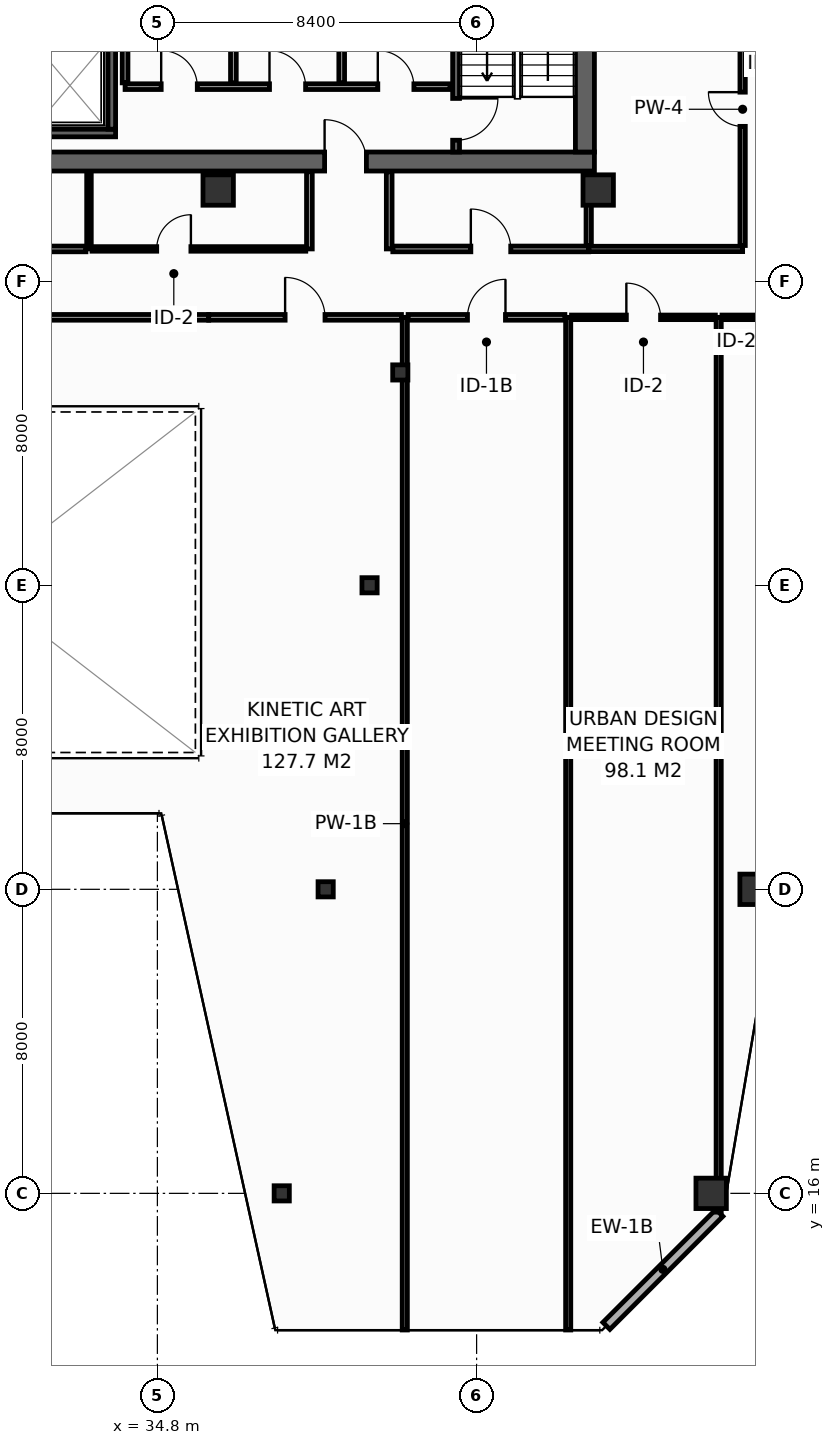
"""IFC4 building model, lengths in metres.
Left out: names, types, materials, properties, quantities, classifications, styles, units other than length and angle.
Written with IfcOpenShell. Run it as: python <this file> out.ifc"""

import sys

from ifc_helpers import new_model, si_unit, direction, frame, frame_2d, origin, origin_2d, place, context, subcontext, project, spatial, rectangle, hollow_rectangle, extrude, element, fill, save


model = new_model("IFC4")
c1 = context("Model", 3, precision=1e-05, world=origin(), true_north=direction((0.0, 1.0)))
c2 = subcontext(c1, "Body", "Model", "MODEL_VIEW")
j1 = project(units=[si_unit("LENGTHUNIT", "METRE"), si_unit("PLANEANGLEUNIT", "RADIAN")], contexts=[c1])
p1 = place(None, origin())
s1 = spatial("IfcSite", under=j1, at=p1, CompositionType="ELEMENT")
p2 = place(p1, origin())
s2 = spatial("IfcBuilding", under=s1, at=p2, CompositionType="ELEMENT")
p3 = place(p2, frame((0.0, 0.0, 201.8)))
s3 = spatial("IfcBuildingStorey", under=s2, at=p3, CompositionType="ELEMENT", Elevation=201.8)
p4 = place(p3, frame((13.6, 43.15, 0.0), z_axis=(0.0, 0.0, 1.0), x_axis=(1.0, 0.0, 0.0)))
e1 = element("IfcWall", 1, at=p4, inside=s3, PredefinedType="SHEAR", context=c2, shape_type="SweptSolid", body=[
    extrude(rectangle(XDim=32.7, YDim=0.5, at=frame_2d((16.35, 0.0))), origin(), (0.0, 0.0, 1.0), 3.55),
])
p5 = place(p4, frame((5.4, 0.0, 0.0)))
e2 = element("IfcOpeningElement", 2, at=p5, cuts=e1, PredefinedType="OPENING", context=c2, shape_type="SweptSolid", body=[
    extrude(rectangle(XDim=1.1, YDim=2.15, at=frame_2d((0.55, 1.075))), frame((0.0, 0.26, 0.0), z_axis=(0.0, -1.0, 0.0), x_axis=(1.0, 0.0, 0.0)), (0.0, 0.0, 1.0), 0.52),
])
p6 = place(p4, frame((25.6, 0.0, 0.0)))
e3 = element("IfcOpeningElement", 3, at=p6, cuts=e1, PredefinedType="OPENING", context=c2, shape_type="SweptSolid", body=[
    extrude(rectangle(XDim=1.1, YDim=2.15, at=frame_2d((0.55, 1.075))), frame((0.0, 0.26, 0.0), z_axis=(0.0, -1.0, 0.0), x_axis=(1.0, 0.0, 0.0)), (0.0, 0.0, 1.0), 0.52),
])
p7 = place(p3, frame((46.05, 43.4, 0.0), z_axis=(0.0, 0.0, 1.0), x_axis=(0.0, 1.0, 0.0)))
e4 = element("IfcWall", 4, at=p7, inside=s3, PredefinedType="SHEAR", context=c2, shape_type="SweptSolid", body=[
    extrude(rectangle(XDim=10.4, YDim=0.5, at=frame_2d((5.2, 0.0))), origin(), (0.0, 0.0, 1.0), 3.55),
])
for number, where, z_axis, x_axis in (
    (5, (36.4, 42.4, 0.0), (0.0, 0.0, 1.0), (1.0, 0.0, 0.0)),
    (6, (46.4, 42.4, 0.0), (0.0, 0.0, 1.0), (1.0, 0.0, 0.0)),
    (7, (49.372, 16.0, 0.0), (0.0, 0.0, 1.0), (1.0, 0.0, 0.0)),
):
    element("IfcColumn", number, at=place(p3, frame(where, z_axis=z_axis, x_axis=x_axis)), inside=s3, PredefinedType="COLUMN", context=c2, shape_type="SweptSolid", body=[
        extrude(hollow_rectangle(XDim=0.8, YDim=0.8, WallThickness=0.036, at=origin_2d()), origin(), (0.0, 0.0, 1.0), 3.8),
    ])
p8 = place(p3, frame((38.072, 16.0, 0.0), z_axis=(0.0, 0.0, 1.0), x_axis=(1.0, 0.0, 0.0)))
e8 = element("IfcColumn", 8, at=p8, inside=s3, PredefinedType="COLUMN", context=c2, shape_type="SweptSolid", body=[
    extrude(hollow_rectangle(XDim=0.4, YDim=0.4, WallThickness=0.016, at=origin_2d()), origin(), (0.0, 0.0, 1.0), 3.8),
])
p9 = place(p3, frame((50.528, 24.0, 0.0), z_axis=(0.0, 0.0, 1.0), x_axis=(1.0, 0.0, 0.0)))
e9 = element("IfcColumn", 9, at=p9, inside=s3, PredefinedType="COLUMN", context=c2, shape_type="SweptSolid", body=[
    extrude(hollow_rectangle(XDim=0.8, YDim=0.8, WallThickness=0.036, at=origin_2d()), origin(), (0.0, 0.0, 1.0), 3.8),
])
for number, where, z_axis, x_axis in (
    (10, (39.228, 24.0, 0.0), (0.0, 0.0, 1.0), (1.0, 0.0, 0.0)),
    (11, (40.383, 32.0, 0.0), (0.0, 0.0, 1.0), (1.0, 0.0, 0.0)),
    (12, (41.192, 37.6, 0.0), (0.0, 0.0, 1.0), (1.0, 0.0, 0.0)),
):
    element("IfcColumn", number, at=place(p3, frame(where, z_axis=z_axis, x_axis=x_axis)), inside=s3, PredefinedType="COLUMN", context=c2, shape_type="SweptSolid", body=[
        extrude(hollow_rectangle(XDim=0.4, YDim=0.4, WallThickness=0.016, at=origin_2d()), origin(), (0.0, 0.0, 1.0), 3.8),
    ])
p10 = place(p3, frame((31.125, 43.9, 0.0), z_axis=(0.0, 0.0, 1.0), x_axis=(1.0, 0.0, 0.0)))
e13 = element("IfcWall", 13, at=p10, inside=s3, PredefinedType="SHEAR", context=c2, shape_type="SweptSolid", body=[
    extrude(rectangle(XDim=2.575, YDim=0.2, at=frame_2d((1.288, 0.0))), origin(), (0.0, 0.0, 1.0), 3.55),
])
p11 = place(p3, frame((33.6, 44.0, 0.0), z_axis=(0.0, 0.0, 1.0), x_axis=(0.0, 1.0, 0.0)))
e14 = element("IfcWall", 14, at=p11, inside=s3, PredefinedType="SHEAR", context=c2, shape_type="SweptSolid", body=[
    extrude(rectangle(XDim=2.3, YDim=0.2, at=frame_2d((1.15, 0.0))), origin(), (0.0, 0.0, 1.0), 3.55),
])
p12 = place(p3, frame((42.66, 53.8, 0.0), z_axis=(0.0, 0.0, 1.0), x_axis=(0.0, -1.0, 0.0)))
e15 = element("IfcWall", 15, at=p12, inside=s3, PredefinedType="SHEAR", context=c2, shape_type="SweptSolid", body=[
    extrude(rectangle(XDim=10.4, YDim=0.18, at=frame_2d((5.2, 0.0))), origin(), (0.0, 0.0, 1.0), 3.55),
])
p13 = place(p12, frame((8.99, 0.0, 0.0)))
e16 = element("IfcOpeningElement", 16, at=p13, cuts=e15, PredefinedType="OPENING", context=c2, shape_type="SweptSolid", body=[
    extrude(rectangle(XDim=1.1, YDim=2.15, at=frame_2d((0.55, 1.075))), frame((0.0, 0.1, 0.0), z_axis=(0.0, -1.0, 0.0), x_axis=(1.0, 0.0, 0.0)), (0.0, 0.0, 1.0), 0.2),
])
p14 = place(p3, frame((33.95, 45.12, 0.0), z_axis=(0.0, 0.0, 1.0), x_axis=(1.0, 0.0, 0.0)))
e17 = element("IfcWall", 17, at=p14, inside=s3, PredefinedType="PARTITIONING", context=c2, shape_type="SweptSolid", body=[
    extrude(rectangle(XDim=8.55, YDim=0.15, at=frame_2d((4.275, 0.0))), origin(), (0.0, 0.0, 1.0), 3.55),
])
p15 = place(p14, frame((0.95, 0.0, 0.0)))
e18 = element("IfcOpeningElement", 18, at=p15, cuts=e17, PredefinedType="OPENING", context=c2, shape_type="SweptSolid", body=[
    extrude(rectangle(XDim=0.95, YDim=2.15, at=frame_2d((0.475, 1.075))), frame((0.0, 0.085, 0.0), z_axis=(0.0, -1.0, 0.0), x_axis=(1.0, 0.0, 0.0)), (0.0, 0.0, 1.0), 0.17),
])
p16 = place(p14, frame((3.8, 0.0, 0.0)))
e19 = element("IfcOpeningElement", 19, at=p16, cuts=e17, PredefinedType="OPENING", context=c2, shape_type="SweptSolid", body=[
    extrude(rectangle(XDim=0.95, YDim=2.15, at=frame_2d((0.475, 1.075))), frame((0.0, 0.085, 0.0), z_axis=(0.0, -1.0, 0.0), x_axis=(1.0, 0.0, 0.0)), (0.0, 0.0, 1.0), 0.17),
])
p17 = place(p14, frame((6.65, 0.0, 0.0)))
e20 = element("IfcOpeningElement", 20, at=p17, cuts=e17, PredefinedType="OPENING", context=c2, shape_type="SweptSolid", body=[
    extrude(rectangle(XDim=0.95, YDim=2.15, at=frame_2d((0.475, 1.075))), frame((0.0, 0.085, 0.0), z_axis=(0.0, -1.0, 0.0), x_axis=(1.0, 0.0, 0.0)), (0.0, 0.0, 1.0), 0.17),
])
for number, where, z_axis, x_axis in (
    (21, (33.95, 45.22, 0.0), (0.0, 0.0, 1.0), (0.0, 1.0, 0.0)),
    (22, (36.8, 45.22, 0.0), (0.0, 0.0, 1.0), (0.0, 1.0, 0.0)),
    (23, (39.65, 45.22, 0.0), (0.0, 0.0, 1.0), (0.0, 1.0, 0.0)),
):
    element("IfcWall", number, at=place(p3, frame(where, z_axis=z_axis, x_axis=x_axis)), inside=s3, PredefinedType="PARTITIONING", context=c2, shape_type="SweptSolid", body=[
        extrude(rectangle(XDim=2.33, YDim=0.15, at=frame_2d((1.165, 0.0))), origin(), (0.0, 0.0, 1.0), 3.55),
    ])
p18 = place(p3, frame((46.615, 12.513, 0.0), z_axis=(0.0, 0.0, 1.0), x_axis=(0.707135806771, 0.70707775441, 0.0)))
e24 = element("IfcWall", 24, at=p18, inside=s3, PredefinedType="STANDARD", context=c2, shape_type="SweptSolid", body=[
    extrude(rectangle(XDim=4.206, YDim=0.26, at=frame_2d((2.103, 0.0))), origin(), (0.0, 0.0, 1.0), 3.55),
])
p19 = place(p3, frame((46.15, 40.85, 0.0), z_axis=(0.0, 0.0, 1.0), x_axis=(1.0, 0.0, 0.0)))
e25 = element("IfcWall", 25, at=p19, inside=s3, PredefinedType="PARTITIONING", context=c2, shape_type="SweptSolid", body=[
    extrude(rectangle(XDim=4.05, YDim=0.14, at=frame_2d((2.025, 0.0))), origin(), (0.0, 0.0, 1.0), 3.55),
])
p20 = place(p3, frame((46.15, 40.94, 0.0), z_axis=(0.0, 0.0, 1.0), x_axis=(0.0, 1.0, 0.0)))
e26 = element("IfcWall", 26, at=p20, inside=s3, PredefinedType="PARTITIONING", context=c2, shape_type="SweptSolid", body=[
    extrude(rectangle(XDim=1.94, YDim=0.14, at=frame_2d((0.97, 0.0))), origin(), (0.0, 0.0, 1.0), 3.55),
])
p21 = place(p3, frame((50.2, 40.94, 0.0), z_axis=(0.0, 0.0, 1.0), x_axis=(0.0, 1.0, 0.0)))
e27 = element("IfcWall", 27, at=p21, inside=s3, PredefinedType="PARTITIONING", context=c2, shape_type="SweptSolid", body=[
    extrude(rectangle(XDim=7.17, YDim=0.14, at=frame_2d((3.585, 0.0))), origin(), (0.0, 0.0, 1.0), 2.835),
])
p22 = place(p21, frame((3.135, 0.0, 0.0)))
e28 = element("IfcOpeningElement", 28, at=p22, cuts=e27, PredefinedType="OPENING", context=c2, shape_type="SweptSolid", body=[
    extrude(rectangle(XDim=0.9, YDim=2.1, at=frame_2d((0.45, 1.05))), frame((0.0, 0.08, 0.0), z_axis=(0.0, -1.0, 0.0), x_axis=(1.0, 0.0, 0.0)), (0.0, 0.0, 1.0), 0.16),
])
for number, where, z_axis, x_axis in (
    (29, (38.8, 40.85, 0.0), (0.0, 0.0, 1.0), (0.0, 1.0, 0.0)),
    (30, (40.9, 40.85, 0.0), (0.0, 0.0, 1.0), (0.0, 1.0, 0.0)),
):
    element("IfcWall", number, at=place(p3, frame(where, z_axis=z_axis, x_axis=x_axis)), inside=s3, PredefinedType="PARTITIONING", context=c2, shape_type="SweptSolid", body=[
        extrude(rectangle(XDim=2.03, YDim=0.15, at=frame_2d((1.015, 0.0))), origin(), (0.0, 0.0, 1.0), 3.55),
    ])
p23 = place(p3, frame((33.0, 40.85, 0.0), z_axis=(0.0, 0.0, 1.0), x_axis=(0.0, 1.0, 0.0)))
e31 = element("IfcWall", 31, at=p23, inside=s3, PredefinedType="PARTITIONING", context=c2, shape_type="SweptSolid", body=[
    extrude(rectangle(XDim=2.03, YDim=0.12, at=frame_2d((1.015, 0.0))), origin(), (0.0, 0.0, 1.0), 2.835),
])
p24 = place(p3, frame((20.795, 40.85, 0.0), z_axis=(0.0, 0.0, 1.0), x_axis=(1.0, 0.0, 0.0)))
e32 = element("IfcWall", 32, at=p24, inside=s3, PredefinedType="PARTITIONING", context=c2, shape_type="SweptSolid", body=[
    extrude(rectangle(XDim=12.125, YDim=0.15, at=frame_2d((6.062, 0.0))), origin(), (0.0, 0.0, 1.0), 2.835),
])
p25 = place(p24, frame((5.537, 0.0, 0.0)))
e33 = element("IfcOpeningElement", 33, at=p25, cuts=e32, PredefinedType="OPENING", context=c2, shape_type="SweptSolid", body=[
    extrude(rectangle(XDim=1.05, YDim=2.15, at=frame_2d((0.525, 1.075))), frame((0.0, 0.085, 0.0), z_axis=(0.0, -1.0, 0.0), x_axis=(1.0, 0.0, 0.0)), (0.0, 0.0, 1.0), 0.17),
])
p26 = place(p3, frame((33.08, 40.85, 0.0), z_axis=(0.0, 0.0, 1.0), x_axis=(1.0, 0.0, 0.0)))
e34 = element("IfcWall", 34, at=p26, inside=s3, PredefinedType="PARTITIONING", context=c2, shape_type="SweptSolid", body=[
    extrude(rectangle(XDim=5.625, YDim=0.12, at=frame_2d((2.812, 0.0))), origin(), (0.0, 0.0, 1.0), 2.835),
])
p27 = place(p26, frame((1.702, 0.0, 0.0)))
e35 = element("IfcOpeningElement", 35, at=p27, cuts=e34, PredefinedType="OPENING", context=c2, shape_type="SweptSolid", body=[
    extrude(rectangle(XDim=0.9, YDim=2.1, at=frame_2d((0.45, 1.05))), frame((0.0, 0.07, 0.0), z_axis=(0.0, -1.0, 0.0), x_axis=(1.0, 0.0, 0.0)), (0.0, 0.0, 1.0), 0.14),
])
p28 = place(p3, frame((40.995, 40.85, 0.0), z_axis=(0.0, 0.0, 1.0), x_axis=(1.0, 0.0, 0.0)))
e36 = element("IfcWall", 36, at=p28, inside=s3, PredefinedType="PARTITIONING", context=c2, shape_type="SweptSolid", body=[
    extrude(rectangle(XDim=5.155, YDim=0.15, at=frame_2d((2.577, 0.0))), origin(), (0.0, 0.0, 1.0), 3.55),
])
p29 = place(p28, frame((2.053, 0.0, 0.0)))
e37 = element("IfcOpeningElement", 37, at=p29, cuts=e36, PredefinedType="OPENING", context=c2, shape_type="SweptSolid", body=[
    extrude(rectangle(XDim=1.05, YDim=2.15, at=frame_2d((0.525, 1.075))), frame((0.0, 0.085, 0.0), z_axis=(0.0, -1.0, 0.0), x_axis=(1.0, 0.0, 0.0)), (0.0, 0.0, 1.0), 0.17),
])
for number, where, z_axis, x_axis in (
    (38, (41.31, 12.405, 0.0), (0.0, 0.0, 1.0), (0.0, 1.0, 0.0)),
    (39, (45.61, 12.405, 0.0), (0.0, 0.0, 1.0), (0.0, 1.0, 0.0)),
):
    element("IfcWall", number, at=place(p3, frame(where, z_axis=z_axis, x_axis=x_axis)), inside=s3, PredefinedType="PARTITIONING", context=c2, shape_type="SweptSolid", body=[
        extrude(rectangle(XDim=26.645, YDim=0.135, at=frame_2d((13.323, 0.0))), origin(), (0.0, 0.0, 1.0), 2.835),
    ])
p30 = place(p3, frame((49.57, 15.506, 0.0), z_axis=(0.0, 0.0, 1.0), x_axis=(0.0, 1.0, 0.0)))
e40 = element("IfcWall", 40, at=p30, inside=s3, PredefinedType="PARTITIONING", context=c2, shape_type="SweptSolid", body=[
    extrude(rectangle(XDim=23.544, YDim=0.135, at=frame_2d((11.772, 0.0))), origin(), (0.0, 0.0, 1.0), 2.835),
])
p31 = place(p3, frame((23.85, 39.05, 0.0), z_axis=(0.0, 0.0, 1.0), x_axis=(1.0, 0.0, 0.0)))
e41 = element("IfcWall", 41, at=p31, inside=s3, PredefinedType="PARTITIONING", context=c2, shape_type="SweptSolid", body=[
    extrude(rectangle(XDim=12.3, YDim=0.15, at=frame_2d((6.15, 0.0))), origin(), (0.0, 0.0, 1.0), 3.55),
])
p32 = place(p3, frame((36.15, 39.05, 0.0), z_axis=(0.0, 0.0, 1.0), x_axis=(1.0, 0.0, 0.0)))
e42 = element("IfcWall", 42, at=p32, inside=s3, PredefinedType="PARTITIONING", context=c2, shape_type="SweptSolid", body=[
    extrude(rectangle(XDim=5.073, YDim=0.15, at=frame_2d((2.536, 0.0))), origin(), (0.0, 0.0, 1.0), 2.835),
])
p33 = place(p32, frame((2.011, 0.0, 0.0)))
e43 = element("IfcOpeningElement", 43, at=p33, cuts=e42, PredefinedType="OPENING", context=c2, shape_type="SweptSolid", body=[
    extrude(rectangle(XDim=1.05, YDim=2.15, at=frame_2d((0.525, 1.075))), frame((0.0, 0.085, 0.0), z_axis=(0.0, -1.0, 0.0), x_axis=(1.0, 0.0, 0.0)), (0.0, 0.0, 1.0), 0.17),
])
p34 = place(p3, frame((41.397, 39.05, 0.0), z_axis=(0.0, 0.0, 1.0), x_axis=(1.0, 0.0, 0.0)))
e44 = element("IfcWall", 44, at=p34, inside=s3, PredefinedType="PARTITIONING", context=c2, shape_type="SweptSolid", body=[
    extrude(rectangle(XDim=4.125, YDim=0.15, at=frame_2d((2.062, 0.0))), origin(), (0.0, 0.0, 1.0), 3.55),
])
p35 = place(p34, frame((1.562, 0.0, 0.0)))
e45 = element("IfcOpeningElement", 45, at=p35, cuts=e44, PredefinedType="OPENING", context=c2, shape_type="SweptSolid", body=[
    extrude(rectangle(XDim=1.0, YDim=2.15, at=frame_2d((0.5, 1.075))), frame((0.0, 0.085, 0.0), z_axis=(0.0, -1.0, 0.0), x_axis=(1.0, 0.0, 0.0)), (0.0, 0.0, 1.0), 0.17),
])
p36 = place(p3, frame((45.698, 39.05, 0.0), z_axis=(0.0, 0.0, 1.0), x_axis=(1.0, 0.0, 0.0)))
e46 = element("IfcWall", 46, at=p36, inside=s3, PredefinedType="PARTITIONING", context=c2, shape_type="SweptSolid", body=[
    extrude(rectangle(XDim=3.785, YDim=0.12, at=frame_2d((1.893, 0.0))), origin(), (0.0, 0.0, 1.0), 3.55),
])
p37 = place(p36, frame((1.443, 0.0, 0.0)))
e47 = element("IfcOpeningElement", 47, at=p37, cuts=e46, PredefinedType="OPENING", context=c2, shape_type="SweptSolid", body=[
    extrude(rectangle(XDim=0.9, YDim=2.1, at=frame_2d((0.45, 1.05))), frame((0.0, 0.07, 0.0), z_axis=(0.0, -1.0, 0.0), x_axis=(1.0, 0.0, 0.0)), (0.0, 0.0, 1.0), 0.14),
])
p38 = place(p3, frame((49.657, 39.05, 0.0), z_axis=(0.0, 0.0, 1.0), x_axis=(1.0, 0.0, 0.0)))
e48 = element("IfcWall", 48, at=p38, inside=s3, PredefinedType="PARTITIONING", context=c2, shape_type="SweptSolid", body=[
    extrude(rectangle(XDim=3.994, YDim=0.12, at=frame_2d((1.997, 0.0))), origin(), (0.0, 0.0, 1.0), 3.035),
])
p39 = place(p38, frame((1.327, 0.0, 0.0)))
e49 = element("IfcOpeningElement", 49, at=p39, cuts=e48, PredefinedType="OPENING", context=c2, shape_type="SweptSolid", body=[
    extrude(rectangle(XDim=0.9, YDim=2.1, at=frame_2d((0.45, 1.05))), frame((0.0, 0.07, 0.0), z_axis=(0.0, -1.0, 0.0), x_axis=(1.0, 0.0, 0.0)), (0.0, 0.0, 1.0), 0.14),
])
p40 = place(p13, origin())
e50 = element("IfcDoor", 50, at=p40, inside=s3, OperationType="SINGLE_SWING_LEFT", PredefinedType="DOOR", context=c2, shape_type="SweptSolid", body=[
    extrude(rectangle(XDim=1.1, YDim=2.15, at=frame_2d((0.55, 1.075))), frame((0.0, 0.025, 0.0), z_axis=(0.0, -1.0, 0.0), x_axis=(1.0, 0.0, 0.0)), (0.0, 0.0, 1.0), 0.05),
])
fill(e16, e50)
p41 = place(p6, origin())
e51 = element("IfcDoor", 51, at=p41, inside=s3, OperationType="SINGLE_SWING_LEFT", PredefinedType="DOOR", context=c2, shape_type="SweptSolid", body=[
    extrude(rectangle(XDim=1.1, YDim=2.15, at=frame_2d((0.55, 1.075))), frame((0.0, 0.025, 0.0), z_axis=(0.0, -1.0, 0.0), x_axis=(1.0, 0.0, 0.0)), (0.0, 0.0, 1.0), 0.05),
])
fill(e3, e51)
p42 = place(p15, origin())
e52 = element("IfcDoor", 52, at=p42, inside=s3, OperationType="SINGLE_SWING_LEFT", PredefinedType="DOOR", context=c2, shape_type="SweptSolid", body=[
    extrude(rectangle(XDim=0.95, YDim=2.15, at=frame_2d((0.475, 1.075))), frame((0.0, 0.025, 0.0), z_axis=(0.0, -1.0, 0.0), x_axis=(1.0, 0.0, 0.0)), (0.0, 0.0, 1.0), 0.05),
])
fill(e18, e52)
p43 = place(p16, origin())
e53 = element("IfcDoor", 53, at=p43, inside=s3, OperationType="SINGLE_SWING_LEFT", PredefinedType="DOOR", context=c2, shape_type="SweptSolid", body=[
    extrude(rectangle(XDim=0.95, YDim=2.15, at=frame_2d((0.475, 1.075))), frame((0.0, 0.025, 0.0), z_axis=(0.0, -1.0, 0.0), x_axis=(1.0, 0.0, 0.0)), (0.0, 0.0, 1.0), 0.05),
])
fill(e19, e53)
p44 = place(p17, origin())
e54 = element("IfcDoor", 54, at=p44, inside=s3, OperationType="SINGLE_SWING_LEFT", PredefinedType="DOOR", context=c2, shape_type="SweptSolid", body=[
    extrude(rectangle(XDim=0.95, YDim=2.15, at=frame_2d((0.475, 1.075))), frame((0.0, 0.025, 0.0), z_axis=(0.0, -1.0, 0.0), x_axis=(1.0, 0.0, 0.0)), (0.0, 0.0, 1.0), 0.05),
])
fill(e20, e54)
p45 = place(p22, origin())
e55 = element("IfcDoor", 55, at=p45, inside=s3, OperationType="SINGLE_SWING_RIGHT", PredefinedType="DOOR", context=c2, shape_type="SweptSolid", body=[
    extrude(rectangle(XDim=0.9, YDim=2.1, at=frame_2d((0.45, 1.05))), frame((0.0, 0.025, 0.0), z_axis=(0.0, -1.0, 0.0), x_axis=(1.0, 0.0, 0.0)), (0.0, 0.0, 1.0), 0.05),
])
fill(e28, e55)
p46 = place(p27, origin())
e56 = element("IfcDoor", 56, at=p46, inside=s3, OperationType="SINGLE_SWING_RIGHT", PredefinedType="DOOR", context=c2, shape_type="SweptSolid", body=[
    extrude(rectangle(XDim=0.9, YDim=2.1, at=frame_2d((0.45, 1.05))), frame((0.0, 0.025, 0.0), z_axis=(0.0, -1.0, 0.0), x_axis=(1.0, 0.0, 0.0)), (0.0, 0.0, 1.0), 0.05),
])
fill(e35, e56)
p47 = place(p29, origin())
e57 = element("IfcDoor", 57, at=p47, inside=s3, OperationType="SINGLE_SWING_LEFT", PredefinedType="DOOR", context=c2, shape_type="SweptSolid", body=[
    extrude(rectangle(XDim=1.05, YDim=2.15, at=frame_2d((0.525, 1.075))), frame((0.0, 0.025, 0.0), z_axis=(0.0, -1.0, 0.0), x_axis=(1.0, 0.0, 0.0)), (0.0, 0.0, 1.0), 0.05),
])
fill(e37, e57)
p48 = place(p33, origin())
e58 = element("IfcDoor", 58, at=p48, inside=s3, OperationType="SINGLE_SWING_LEFT", PredefinedType="DOOR", context=c2, shape_type="SweptSolid", body=[
    extrude(rectangle(XDim=1.05, YDim=2.15, at=frame_2d((0.525, 1.075))), frame((0.0, 0.025, 0.0), z_axis=(0.0, -1.0, 0.0), x_axis=(1.0, 0.0, 0.0)), (0.0, 0.0, 1.0), 0.05),
])
fill(e43, e58)
p49 = place(p35, origin())
e59 = element("IfcDoor", 59, at=p49, inside=s3, OperationType="SINGLE_SWING_RIGHT", PredefinedType="DOOR", context=c2, shape_type="SweptSolid", body=[
    extrude(rectangle(XDim=1.0, YDim=2.15, at=frame_2d((0.5, 1.075))), frame((0.0, 0.025, 0.0), z_axis=(0.0, -1.0, 0.0), x_axis=(1.0, 0.0, 0.0)), (0.0, 0.0, 1.0), 0.05),
])
fill(e45, e59)
p50 = place(p37, origin())
e60 = element("IfcDoor", 60, at=p50, inside=s3, OperationType="SINGLE_SWING_LEFT", PredefinedType="DOOR", context=c2, shape_type="SweptSolid", body=[
    extrude(rectangle(XDim=0.9, YDim=2.1, at=frame_2d((0.45, 1.05))), frame((0.0, 0.025, 0.0), z_axis=(0.0, -1.0, 0.0), x_axis=(1.0, 0.0, 0.0)), (0.0, 0.0, 1.0), 0.05),
])
fill(e47, e60)
save(model, sys.argv[1])
